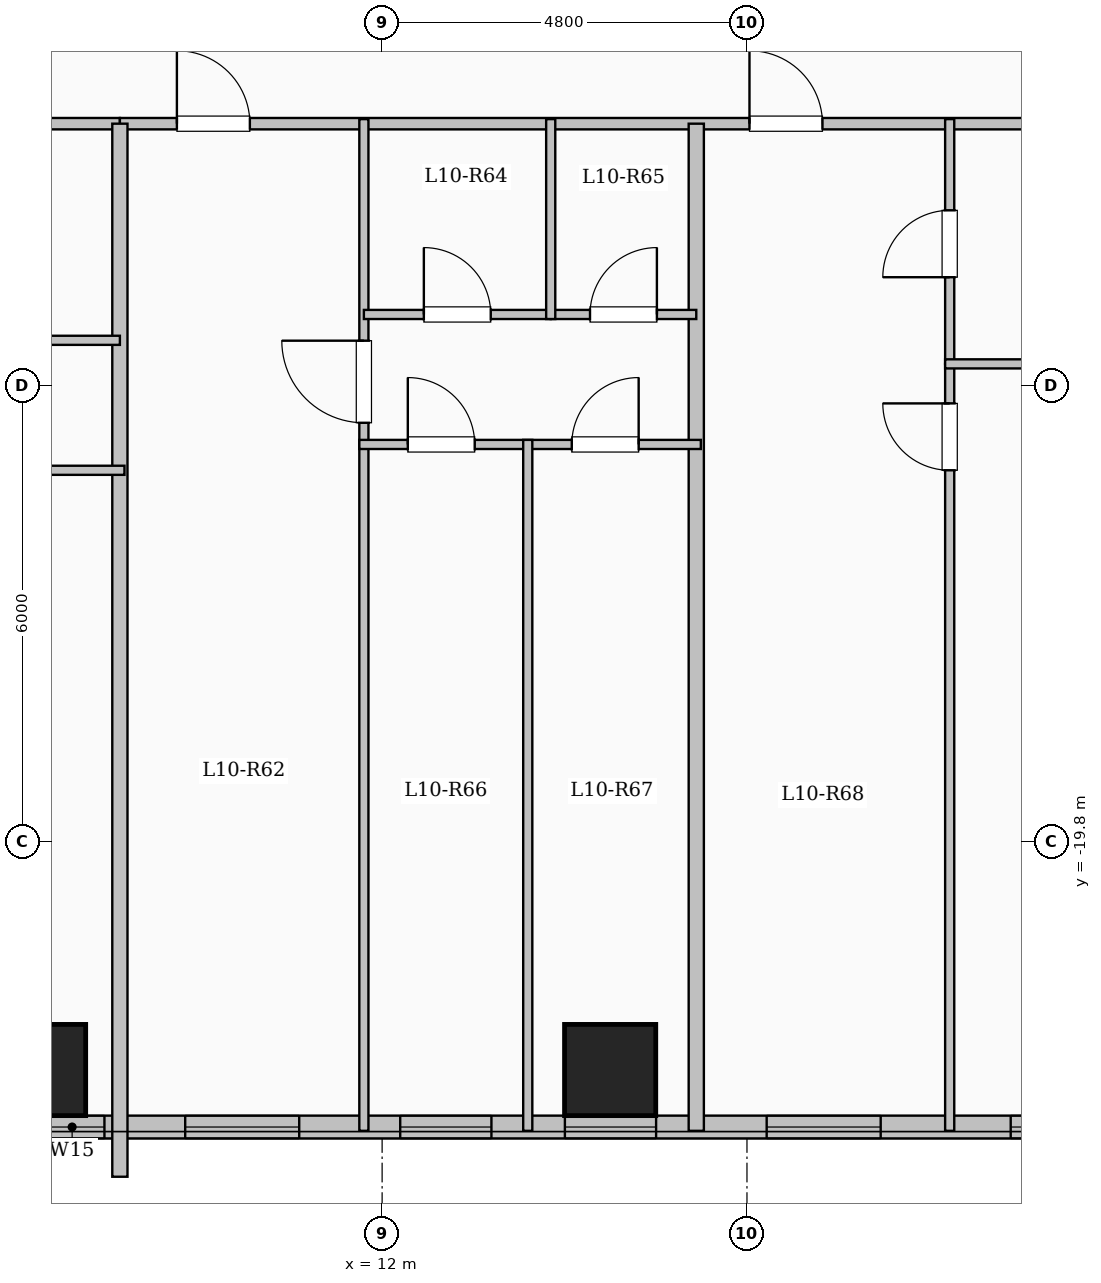
"""IFC4 building model, lengths in metres.
Left out: names, types, materials, properties, quantities, classifications, styles, units other than length and angle.
Written with IfcOpenShell. Run it as: python <this file> out.ifc"""

import sys

from ifc_helpers import new_model, si_unit, direction, frame, frame_2d, origin, origin_2d, place, context, subcontext, project, spatial, rectangle, extrude, element, fill, save


model = new_model("IFC4")
c1 = context("Model", 3, precision=1e-05, world=origin(), true_north=direction((0.0, 1.0)))
c2 = subcontext(c1, "Body", "Model", "MODEL_VIEW")
j1 = project(units=[si_unit("LENGTHUNIT", "METRE"), si_unit("PLANEANGLEUNIT", "RADIAN")], contexts=[c1])
p1 = place(None, origin())
s1 = spatial("IfcSite", under=j1, at=p1, CompositionType="ELEMENT")
p2 = place(p1, origin())
s2 = spatial("IfcBuilding", under=s1, at=p2, CompositionType="ELEMENT")
p3 = place(p2, frame((0.0, 0.0, 40.75)))
s3 = spatial("IfcBuildingStorey", under=s2, at=p3, CompositionType="ELEMENT", Elevation=40.75)
for number, where, z_axis, x_axis in (
    (1, (7.5, -22.8, 0.0), (0.0, 0.0, 1.0), (1.0, 0.0, 0.0)),
    (2, (15.0, -22.8, 0.0), (0.0, 0.0, 1.0), (1.0, 0.0, 0.0)),
):
    element("IfcColumn", number, at=place(p3, frame(where, z_axis=z_axis, x_axis=x_axis)), inside=s3, PredefinedType="COLUMN", context=c2, shape_type="SweptSolid", body=[
        extrude(rectangle(XDim=1.2, YDim=1.2, at=origin_2d()), origin(), (0.0, 0.0, 1.0), 3.35),
    ])
p4 = place(p3, frame((22.65, -23.55, 0.0), z_axis=(0.0, 0.0, 1.0), x_axis=(-1.0, 0.0, 0.0)))
e3 = element("IfcWall", 3, at=p4, inside=s3, PredefinedType="SOLIDWALL", context=c2, shape_type="SweptSolid", body=[
    extrude(rectangle(XDim=15.3, YDim=0.3, at=frame_2d((7.65, 0.0))), origin(), (0.0, 0.0, 1.0), 3.1),
])
p5 = place(p4, frame((0.88, 0.0, 0.9)))
e4 = element("IfcOpeningElement", 4, at=p5, cuts=e3, PredefinedType="OPENING", context=c2, shape_type="SweptSolid", body=[
    extrude(rectangle(XDim=1.5, YDim=1.65, at=frame_2d((0.75, 0.825))), frame((0.0, 0.16, 0.0), z_axis=(0.0, -1.0, 0.0), x_axis=(1.0, 0.0, 0.0)), (0.0, 0.0, 1.0), 0.32),
])
p6 = place(p4, frame((4.091, 0.0, 0.9)))
e5 = element("IfcOpeningElement", 5, at=p6, cuts=e3, PredefinedType="OPENING", context=c2, shape_type="SweptSolid", body=[
    extrude(rectangle(XDim=1.5, YDim=1.65, at=frame_2d((0.75, 0.825))), frame((0.0, 0.16, 0.0), z_axis=(0.0, -1.0, 0.0), x_axis=(1.0, 0.0, 0.0)), (0.0, 0.0, 1.0), 0.32),
])
p7 = place(p4, frame((7.045, 0.0, 0.95)))
e6 = element("IfcOpeningElement", 6, at=p7, cuts=e3, PredefinedType="OPENING", context=c2, shape_type="SweptSolid", body=[
    extrude(rectangle(XDim=1.2, YDim=1.5, at=frame_2d((0.6, 0.75))), frame((0.0, 0.16, 0.0), z_axis=(0.0, -1.0, 0.0), x_axis=(1.0, 0.0, 0.0)), (0.0, 0.0, 1.0), 0.32),
])
p8 = place(p4, frame((9.212, 0.0, 0.95)))
e7 = element("IfcOpeningElement", 7, at=p8, cuts=e3, PredefinedType="OPENING", context=c2, shape_type="SweptSolid", body=[
    extrude(rectangle(XDim=1.2, YDim=1.5, at=frame_2d((0.6, 0.75))), frame((0.0, 0.16, 0.0), z_axis=(0.0, -1.0, 0.0), x_axis=(1.0, 0.0, 0.0)), (0.0, 0.0, 1.0), 0.32),
])
p9 = place(p4, frame((11.741, 0.0, 0.9)))
e8 = element("IfcOpeningElement", 8, at=p9, cuts=e3, PredefinedType="OPENING", context=c2, shape_type="SweptSolid", body=[
    extrude(rectangle(XDim=1.5, YDim=1.65, at=frame_2d((0.75, 0.825))), frame((0.0, 0.16, 0.0), z_axis=(0.0, -1.0, 0.0), x_axis=(1.0, 0.0, 0.0)), (0.0, 0.0, 1.0), 0.32),
])
p10 = place(p4, frame((14.303, 0.0, 0.95)))
e9 = element("IfcOpeningElement", 9, at=p10, cuts=e3, PredefinedType="OPENING", context=c2, shape_type="SweptSolid", body=[
    extrude(rectangle(XDim=0.85, YDim=1.5, at=frame_2d((0.425, 0.75))), frame((0.0, 0.16, 0.0), z_axis=(0.0, -1.0, 0.0), x_axis=(1.0, 0.0, 0.0)), (0.0, 0.0, 1.0), 0.32),
])
p11 = place(p3, frame((-8.55, -10.35, 0.0), z_axis=(0.0, 0.0, 1.0), x_axis=(1.0, 0.0, 0.0)))
e10 = element("IfcWall", 10, at=p11, inside=s3, PredefinedType="PARTITIONING", context=c2, shape_type="SweptSolid", body=[
    extrude(rectangle(XDim=17.1, YDim=0.15, at=frame_2d((8.55, 0.0))), origin(), (0.0, 0.0, 1.0), 3.1),
])
p12 = place(p11, frame((0.8, 0.0, 0.0)))
e11 = element("IfcOpeningElement", 11, at=p12, cuts=e10, PredefinedType="OPENING", context=c2, shape_type="SweptSolid", body=[
    extrude(rectangle(XDim=0.96, YDim=2.15, at=frame_2d((0.48, 1.075))), frame((0.0, 0.085, 0.0), z_axis=(0.0, -1.0, 0.0), x_axis=(1.0, 0.0, 0.0)), (0.0, 0.0, 1.0), 0.17),
])
p13 = place(p3, frame((8.55, -10.35, 0.0), z_axis=(0.0, 0.0, 1.0), x_axis=(1.0, 0.0, 0.0)))
e12 = element("IfcWall", 12, at=p13, inside=s3, PredefinedType="PARTITIONING", context=c2, shape_type="SweptSolid", body=[
    extrude(rectangle(XDim=14.0, YDim=0.15, at=frame_2d((7.0, 0.0))), origin(), (0.0, 0.0, 1.0), 3.1),
])
p14 = place(p13, frame((0.75, 0.0, 0.0)))
e13 = element("IfcOpeningElement", 13, at=p14, cuts=e12, PredefinedType="OPENING", context=c2, shape_type="SweptSolid", body=[
    extrude(rectangle(XDim=0.96, YDim=2.15, at=frame_2d((0.48, 1.075))), frame((0.0, 0.085, 0.0), z_axis=(0.0, -1.0, 0.0), x_axis=(1.0, 0.0, 0.0)), (0.0, 0.0, 1.0), 0.17),
])
p15 = place(p13, frame((8.283, 0.0, 0.0)))
e14 = element("IfcOpeningElement", 14, at=p15, cuts=e12, PredefinedType="OPENING", context=c2, shape_type="SweptSolid", body=[
    extrude(rectangle(XDim=0.96, YDim=2.15, at=frame_2d((0.48, 1.075))), frame((0.0, 0.085, 0.0), z_axis=(0.0, -1.0, 0.0), x_axis=(1.0, 0.0, 0.0)), (0.0, 0.0, 1.0), 0.17),
])
p16 = place(p3, frame((16.133, -23.6, 0.0), z_axis=(0.0, 0.0, 1.0), x_axis=(0.0, 1.0, 0.0)))
e15 = element("IfcWall", 15, at=p16, inside=s3, PredefinedType="SOLIDWALL", context=c2, shape_type="SweptSolid", body=[
    extrude(rectangle(XDim=13.25, YDim=0.2, at=frame_2d((6.625, 0.0))), origin(), (0.0, 0.0, 1.0), 3.1),
])
p17 = place(p3, frame((11.76, -23.6, 0.0), z_axis=(0.0, 0.0, 1.0), x_axis=(0.0, 1.0, 0.0)))
e16 = element("IfcWall", 16, at=p17, inside=s3, PredefinedType="PARTITIONING", context=c2, shape_type="SweptSolid", body=[
    extrude(rectangle(XDim=13.31, YDim=0.12, at=frame_2d((6.655, 0.0))), origin(), (0.0, 0.0, 1.0), 3.1),
])
p18 = place(p17, frame((9.315, 0.0, 0.0)))
e17 = element("IfcOpeningElement", 17, at=p18, cuts=e16, PredefinedType="OPENING", context=c2, shape_type="SweptSolid", body=[
    extrude(rectangle(XDim=1.08, YDim=2.15, at=frame_2d((0.54, 1.075))), frame((0.0, 0.07, 0.0), z_axis=(0.0, -1.0, 0.0), x_axis=(1.0, 0.0, 0.0)), (0.0, 0.0, 1.0), 0.14),
])
p19 = place(p3, frame((11.76, -12.86, 0.0), z_axis=(0.0, 0.0, 1.0), x_axis=(1.0, 0.0, 0.0)))
e18 = element("IfcWall", 18, at=p19, inside=s3, PredefinedType="PARTITIONING", context=c2, shape_type="SweptSolid", body=[
    extrude(rectangle(XDim=2.458, YDim=0.12, at=frame_2d((1.229, 0.0))), origin(), (0.0, 0.0, 1.0), 2.585),
])
p20 = place(p19, frame((0.789, 0.0, 0.0)))
e19 = element("IfcOpeningElement", 19, at=p20, cuts=e18, PredefinedType="OPENING", context=c2, shape_type="SweptSolid", body=[
    extrude(rectangle(XDim=0.88, YDim=2.1, at=frame_2d((0.44, 1.05))), frame((0.0, 0.07, 0.0), z_axis=(0.0, -1.0, 0.0), x_axis=(1.0, 0.0, 0.0)), (0.0, 0.0, 1.0), 0.14),
])
p21 = place(p3, frame((14.218, -12.86, 0.0), z_axis=(0.0, 0.0, 1.0), x_axis=(1.0, 0.0, 0.0)))
e20 = element("IfcWall", 20, at=p21, inside=s3, PredefinedType="PARTITIONING", context=c2, shape_type="SweptSolid", body=[
    extrude(rectangle(XDim=1.915, YDim=0.12, at=frame_2d((0.958, 0.0))), origin(), (0.0, 0.0, 1.0), 2.585),
])
p22 = place(p21, frame((0.517, 0.0, 0.0)))
e21 = element("IfcOpeningElement", 21, at=p22, cuts=e20, PredefinedType="OPENING", context=c2, shape_type="SweptSolid", body=[
    extrude(rectangle(XDim=0.88, YDim=2.1, at=frame_2d((0.44, 1.05))), frame((0.0, 0.07, 0.0), z_axis=(0.0, -1.0, 0.0), x_axis=(1.0, 0.0, 0.0)), (0.0, 0.0, 1.0), 0.14),
])
p23 = place(p3, frame((11.7, -14.57, 0.0), z_axis=(0.0, 0.0, 1.0), x_axis=(1.0, 0.0, 0.0)))
e22 = element("IfcWall", 22, at=p23, inside=s3, PredefinedType="PARTITIONING", context=c2, shape_type="SweptSolid", body=[
    extrude(rectangle(XDim=4.493, YDim=0.12, at=frame_2d((2.247, 0.0))), origin(), (0.0, 0.0, 1.0), 3.1),
])
p24 = place(p23, frame((0.638, 0.0, 0.0)))
e23 = element("IfcOpeningElement", 23, at=p24, cuts=e22, PredefinedType="OPENING", context=c2, shape_type="SweptSolid", body=[
    extrude(rectangle(XDim=0.88, YDim=2.1, at=frame_2d((0.44, 1.05))), frame((0.0, 0.07, 0.0), z_axis=(0.0, -1.0, 0.0), x_axis=(1.0, 0.0, 0.0)), (0.0, 0.0, 1.0), 0.14),
])
p25 = place(p23, frame((2.795, 0.0, 0.0)))
e24 = element("IfcOpeningElement", 24, at=p25, cuts=e22, PredefinedType="OPENING", context=c2, shape_type="SweptSolid", body=[
    extrude(rectangle(XDim=0.88, YDim=2.1, at=frame_2d((0.44, 1.05))), frame((0.0, 0.07, 0.0), z_axis=(0.0, -1.0, 0.0), x_axis=(1.0, 0.0, 0.0)), (0.0, 0.0, 1.0), 0.14),
])
p26 = place(p3, frame((14.218, -12.92, 0.0), z_axis=(0.0, 0.0, 1.0), x_axis=(0.0, 1.0, 0.0)))
e25 = element("IfcWall", 25, at=p26, inside=s3, PredefinedType="PARTITIONING", context=c2, shape_type="SweptSolid", body=[
    extrude(rectangle(XDim=2.63, YDim=0.12, at=frame_2d((1.315, 0.0))), origin(), (0.0, 0.0, 1.0), 3.1),
])
p27 = place(p3, frame((13.916, -23.6, 0.0), z_axis=(0.0, 0.0, 1.0), x_axis=(0.0, 1.0, 0.0)))
e26 = element("IfcWall", 26, at=p27, inside=s3, PredefinedType="PARTITIONING", context=c2, shape_type="SweptSolid", body=[
    extrude(rectangle(XDim=9.09, YDim=0.12, at=frame_2d((4.545, 0.0))), origin(), (0.0, 0.0, 1.0), 3.1),
])
p28 = place(p3, frame((19.467, -23.6, 0.0), z_axis=(0.0, 0.0, 1.0), x_axis=(0.0, 1.0, 0.0)))
e27 = element("IfcWall", 27, at=p28, inside=s3, PredefinedType="PARTITIONING", context=c2, shape_type="SweptSolid", body=[
    extrude(rectangle(XDim=10.09, YDim=0.12, at=frame_2d((5.045, 0.0))), origin(), (0.0, 0.0, 1.0), 3.1),
])
p29 = place(p28, frame((8.69, 0.0, 0.0)))
e28 = element("IfcOpeningElement", 28, at=p29, cuts=e27, PredefinedType="OPENING", context=c2, shape_type="SweptSolid", body=[
    extrude(rectangle(XDim=0.88, YDim=2.1, at=frame_2d((0.44, 1.05))), frame((0.0, 0.07, 0.0), z_axis=(0.0, -1.0, 0.0), x_axis=(1.0, 0.0, 0.0)), (0.0, 0.0, 1.0), 0.14),
])
p30 = place(p3, frame((19.467, -13.51, 0.0), z_axis=(0.0, 0.0, 1.0), x_axis=(0.0, 1.0, 0.0)))
e29 = element("IfcWall", 29, at=p30, inside=s3, PredefinedType="PARTITIONING", context=c2, shape_type="SweptSolid", body=[
    extrude(rectangle(XDim=3.22, YDim=0.12, at=frame_2d((1.61, 0.0))), origin(), (0.0, 0.0, 1.0), 3.1),
])
p31 = place(p30, frame((1.14, 0.0, 0.0)))
e30 = element("IfcOpeningElement", 30, at=p31, cuts=e29, PredefinedType="OPENING", context=c2, shape_type="SweptSolid", body=[
    extrude(rectangle(XDim=0.88, YDim=2.1, at=frame_2d((0.44, 1.05))), frame((0.0, 0.07, 0.0), z_axis=(0.0, -1.0, 0.0), x_axis=(1.0, 0.0, 0.0)), (0.0, 0.0, 1.0), 0.14),
])
p32 = place(p3, frame((19.407, -13.51, 0.0), z_axis=(0.0, 0.0, 1.0), x_axis=(1.0, 0.0, 0.0)))
e31 = element("IfcWall", 31, at=p32, inside=s3, PredefinedType="PARTITIONING", context=c2, shape_type="SweptSolid", body=[
    extrude(rectangle(XDim=3.203, YDim=0.12, at=frame_2d((1.602, 0.0))), origin(), (0.0, 0.0, 1.0), 3.1),
])
p33 = place(p3, frame((8.55, -24.204, 0.0), z_axis=(0.0, 0.0, 1.0), x_axis=(0.0, 1.0, 0.0)))
e32 = element("IfcWall", 32, at=p33, inside=s3, PredefinedType="SOLIDWALL", context=c2, shape_type="SweptSolid", body=[
    extrude(rectangle(XDim=13.854, YDim=0.2, at=frame_2d((6.927, 0.0))), origin(), (0.0, 0.0, 1.0), 3.1),
])
p34 = place(p3, frame((3.223, -13.2, 0.0), z_axis=(0.0, 0.0, 1.0), x_axis=(1.0, 0.0, 0.0)))
e33 = element("IfcWall", 33, at=p34, inside=s3, PredefinedType="PARTITIONING", context=c2, shape_type="SweptSolid", body=[
    extrude(rectangle(XDim=5.327, YDim=0.12, at=frame_2d((2.664, 0.0))), origin(), (0.0, 0.0, 1.0), 3.1),
])
p35 = place(p34, frame((2.224, 0.0, 0.0)))
e34 = element("IfcOpeningElement", 34, at=p35, cuts=e33, PredefinedType="OPENING", context=c2, shape_type="SweptSolid", body=[
    extrude(rectangle(XDim=0.88, YDim=2.1, at=frame_2d((0.44, 1.05))), frame((0.0, 0.07, 0.0), z_axis=(0.0, -1.0, 0.0), x_axis=(1.0, 0.0, 0.0)), (0.0, 0.0, 1.0), 0.14),
])
p36 = place(p3, frame((-2.777, -14.91, 0.0), z_axis=(0.0, 0.0, 1.0), x_axis=(1.0, 0.0, 0.0)))
e35 = element("IfcWall", 35, at=p36, inside=s3, PredefinedType="PARTITIONING", context=c2, shape_type="SweptSolid", body=[
    extrude(rectangle(XDim=11.387, YDim=0.12, at=frame_2d((5.694, 0.0))), origin(), (0.0, 0.0, 1.0), 2.585),
])
p37 = place(p36, frame((1.428, 0.0, 0.0)))
e36 = element("IfcOpeningElement", 36, at=p37, cuts=e35, PredefinedType="OPENING", context=c2, shape_type="SweptSolid", body=[
    extrude(rectangle(XDim=0.88, YDim=2.1, at=frame_2d((0.44, 1.05))), frame((0.0, 0.07, 0.0), z_axis=(0.0, -1.0, 0.0), x_axis=(1.0, 0.0, 0.0)), (0.0, 0.0, 1.0), 0.14),
])
p38 = place(p36, frame((5.164, 0.0, 0.0)))
e37 = element("IfcOpeningElement", 37, at=p38, cuts=e35, PredefinedType="OPENING", context=c2, shape_type="SweptSolid", body=[
    extrude(rectangle(XDim=0.88, YDim=2.1, at=frame_2d((0.44, 1.05))), frame((0.0, 0.07, 0.0), z_axis=(0.0, -1.0, 0.0), x_axis=(1.0, 0.0, 0.0)), (0.0, 0.0, 1.0), 0.14),
])
p39 = place(p36, frame((8.899, 0.0, 0.0)))
e38 = element("IfcOpeningElement", 38, at=p39, cuts=e35, PredefinedType="OPENING", context=c2, shape_type="SweptSolid", body=[
    extrude(rectangle(XDim=0.88, YDim=2.1, at=frame_2d((0.44, 1.05))), frame((0.0, 0.07, 0.0), z_axis=(0.0, -1.0, 0.0), x_axis=(1.0, 0.0, 0.0)), (0.0, 0.0, 1.0), 0.14),
])
p40 = place(p5, origin())
e39 = element("IfcWindow", 39, at=p40, inside=s3, PartitioningType="SINGLE_PANEL", PredefinedType="WINDOW", context=c2, shape_type="SweptSolid", body=[
    extrude(rectangle(XDim=1.5, YDim=1.65, at=frame_2d((0.75, 0.825))), frame((0.0, 0.03, 0.0), z_axis=(0.0, -1.0, 0.0), x_axis=(1.0, 0.0, 0.0)), (0.0, 0.0, 1.0), 0.06),
])
fill(e4, e39)
p41 = place(p6, origin())
e40 = element("IfcWindow", 40, at=p41, inside=s3, PartitioningType="SINGLE_PANEL", PredefinedType="WINDOW", context=c2, shape_type="SweptSolid", body=[
    extrude(rectangle(XDim=1.5, YDim=1.65, at=frame_2d((0.75, 0.825))), frame((0.0, 0.03, 0.0), z_axis=(0.0, -1.0, 0.0), x_axis=(1.0, 0.0, 0.0)), (0.0, 0.0, 1.0), 0.06),
])
fill(e5, e40)
p42 = place(p7, origin())
e41 = element("IfcWindow", 41, at=p42, inside=s3, PartitioningType="SINGLE_PANEL", PredefinedType="WINDOW", context=c2, shape_type="SweptSolid", body=[
    extrude(rectangle(XDim=1.2, YDim=1.5, at=frame_2d((0.6, 0.75))), frame((0.0, 0.03, 0.0), z_axis=(0.0, -1.0, 0.0), x_axis=(1.0, 0.0, 0.0)), (0.0, 0.0, 1.0), 0.06),
])
fill(e6, e41)
p43 = place(p8, origin())
e42 = element("IfcWindow", 42, at=p43, inside=s3, PartitioningType="SINGLE_PANEL", PredefinedType="WINDOW", context=c2, shape_type="SweptSolid", body=[
    extrude(rectangle(XDim=1.2, YDim=1.5, at=frame_2d((0.6, 0.75))), frame((0.0, 0.03, 0.0), z_axis=(0.0, -1.0, 0.0), x_axis=(1.0, 0.0, 0.0)), (0.0, 0.0, 1.0), 0.06),
])
fill(e7, e42)
p44 = place(p9, origin())
e43 = element("IfcWindow", 43, at=p44, inside=s3, PartitioningType="SINGLE_PANEL", PredefinedType="WINDOW", context=c2, shape_type="SweptSolid", body=[
    extrude(rectangle(XDim=1.5, YDim=1.65, at=frame_2d((0.75, 0.825))), frame((0.0, 0.03, 0.0), z_axis=(0.0, -1.0, 0.0), x_axis=(1.0, 0.0, 0.0)), (0.0, 0.0, 1.0), 0.06),
])
fill(e8, e43)
p45 = place(p10, origin())
e44 = element("IfcWindow", 44, at=p45, inside=s3, PartitioningType="SINGLE_PANEL", PredefinedType="WINDOW", context=c2, shape_type="SweptSolid", body=[
    extrude(rectangle(XDim=0.85, YDim=1.5, at=frame_2d((0.425, 0.75))), frame((0.0, 0.03, 0.0), z_axis=(0.0, -1.0, 0.0), x_axis=(1.0, 0.0, 0.0)), (0.0, 0.0, 1.0), 0.06),
])
fill(e9, e44)
p46 = place(p14, origin())
e45 = element("IfcDoor", 45, at=p46, inside=s3, OperationType="SINGLE_SWING_LEFT", PredefinedType="DOOR", context=c2, shape_type="SweptSolid", body=[
    extrude(rectangle(XDim=0.96, YDim=2.15, at=frame_2d((0.48, 1.075))), frame((0.0, 0.025, 0.0), z_axis=(0.0, -1.0, 0.0), x_axis=(1.0, 0.0, 0.0)), (0.0, 0.0, 1.0), 0.05),
])
fill(e13, e45)
p47 = place(p18, origin())
e46 = element("IfcDoor", 46, at=p47, inside=s3, OperationType="SINGLE_SWING_RIGHT", PredefinedType="DOOR", context=c2, shape_type="SweptSolid", body=[
    extrude(rectangle(XDim=1.08, YDim=2.15, at=frame_2d((0.54, 1.075))), frame((0.0, 0.025, 0.0), z_axis=(0.0, -1.0, 0.0), x_axis=(1.0, 0.0, 0.0)), (0.0, 0.0, 1.0), 0.05),
])
fill(e17, e46)
p48 = place(p20, origin())
e47 = element("IfcDoor", 47, at=p48, inside=s3, OperationType="SINGLE_SWING_LEFT", PredefinedType="DOOR", context=c2, shape_type="SweptSolid", body=[
    extrude(rectangle(XDim=0.88, YDim=2.1, at=frame_2d((0.44, 1.05))), frame((0.0, 0.025, 0.0), z_axis=(0.0, -1.0, 0.0), x_axis=(1.0, 0.0, 0.0)), (0.0, 0.0, 1.0), 0.05),
])
fill(e19, e47)
p49 = place(p22, origin())
e48 = element("IfcDoor", 48, at=p49, inside=s3, OperationType="SINGLE_SWING_RIGHT", PredefinedType="DOOR", context=c2, shape_type="SweptSolid", body=[
    extrude(rectangle(XDim=0.88, YDim=2.1, at=frame_2d((0.44, 1.05))), frame((0.0, 0.025, 0.0), z_axis=(0.0, -1.0, 0.0), x_axis=(1.0, 0.0, 0.0)), (0.0, 0.0, 1.0), 0.05),
])
fill(e21, e48)
p50 = place(p24, origin())
e49 = element("IfcDoor", 49, at=p50, inside=s3, OperationType="SINGLE_SWING_LEFT", PredefinedType="DOOR", context=c2, shape_type="SweptSolid", body=[
    extrude(rectangle(XDim=0.88, YDim=2.1, at=frame_2d((0.44, 1.05))), frame((0.0, 0.025, 0.0), z_axis=(0.0, -1.0, 0.0), x_axis=(1.0, 0.0, 0.0)), (0.0, 0.0, 1.0), 0.05),
])
fill(e23, e49)
p51 = place(p25, origin())
e50 = element("IfcDoor", 50, at=p51, inside=s3, OperationType="SINGLE_SWING_RIGHT", PredefinedType="DOOR", context=c2, shape_type="SweptSolid", body=[
    extrude(rectangle(XDim=0.88, YDim=2.1, at=frame_2d((0.44, 1.05))), frame((0.0, 0.025, 0.0), z_axis=(0.0, -1.0, 0.0), x_axis=(1.0, 0.0, 0.0)), (0.0, 0.0, 1.0), 0.05),
])
fill(e24, e50)
p52 = place(p15, origin())
e51 = element("IfcDoor", 51, at=p52, inside=s3, OperationType="SINGLE_SWING_LEFT", PredefinedType="DOOR", context=c2, shape_type="SweptSolid", body=[
    extrude(rectangle(XDim=0.96, YDim=2.15, at=frame_2d((0.48, 1.075))), frame((0.0, 0.025, 0.0), z_axis=(0.0, -1.0, 0.0), x_axis=(1.0, 0.0, 0.0)), (0.0, 0.0, 1.0), 0.05),
])
fill(e14, e51)
p53 = place(p29, origin())
e52 = element("IfcDoor", 52, at=p53, inside=s3, OperationType="SINGLE_SWING_RIGHT", PredefinedType="DOOR", context=c2, shape_type="SweptSolid", body=[
    extrude(rectangle(XDim=0.88, YDim=2.1, at=frame_2d((0.44, 1.05))), frame((0.0, 0.025, 0.0), z_axis=(0.0, -1.0, 0.0), x_axis=(1.0, 0.0, 0.0)), (0.0, 0.0, 1.0), 0.05),
])
fill(e28, e52)
p54 = place(p31, origin())
e53 = element("IfcDoor", 53, at=p54, inside=s3, OperationType="SINGLE_SWING_LEFT", PredefinedType="DOOR", context=c2, shape_type="SweptSolid", body=[
    extrude(rectangle(XDim=0.88, YDim=2.1, at=frame_2d((0.44, 1.05))), frame((0.0, 0.025, 0.0), z_axis=(0.0, -1.0, 0.0), x_axis=(1.0, 0.0, 0.0)), (0.0, 0.0, 1.0), 0.05),
])
fill(e30, e53)
save(model, sys.argv[1])
